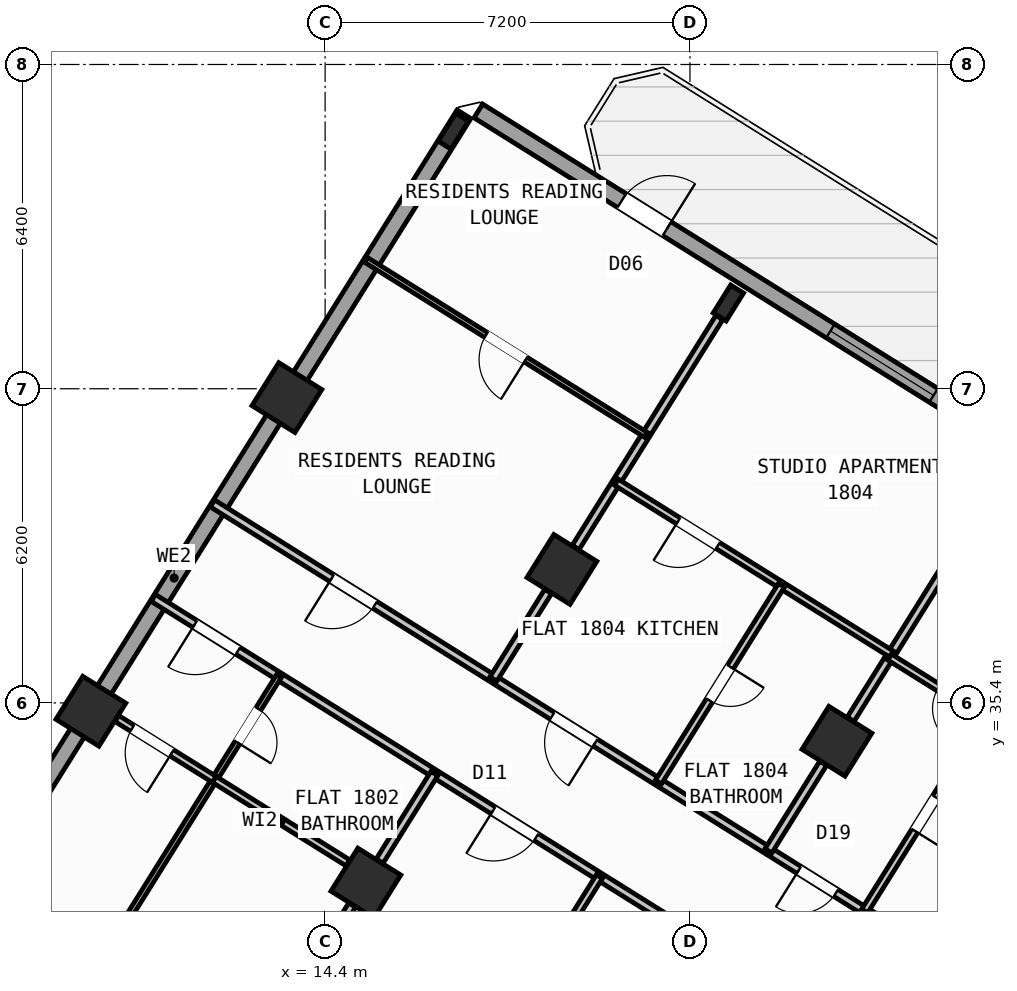
"""IFC4 building model, lengths in metres.
Left out: names, types, materials, properties, quantities, classifications, styles, units other than length and angle.
Written with IfcOpenShell. Run it as: python <this file> out.ifc"""

import sys

from ifc_helpers import new_model, si_unit, direction, frame, frame_2d, origin, origin_2d, place, context, subcontext, project, spatial, rectangle, hollow_rectangle, i_section, extrude, source, transform, mapped, element, fill, save


model = new_model("IFC4")
c1 = context("Model", 3, precision=1e-05, world=origin(), true_north=direction((0.0, 1.0)))
c2 = subcontext(c1, "Body", "Model", "MODEL_VIEW")
j1 = project(units=[si_unit("LENGTHUNIT", "METRE"), si_unit("PLANEANGLEUNIT", "RADIAN")], contexts=[c1])
p1 = place(None, origin())
s1 = spatial("IfcSite", under=j1, at=p1, CompositionType="ELEMENT")
p2 = place(p1, origin())
s2 = spatial("IfcBuilding", under=s1, at=p2, CompositionType="ELEMENT")
p3 = place(p2, frame((0.0, 0.0, 71.7)))
s3 = spatial("IfcBuildingStorey", under=s2, at=p3, CompositionType="ELEMENT", Elevation=71.7)
m1 = source(origin(), c2, "Body", "SweptSolid", [
    extrude(hollow_rectangle(XDim=1.0, YDim=1.0, WallThickness=0.04, at=origin_2d()), origin(), (0.0, 0.0, 1.0), 4.8),
])
p4 = place(p3, frame((24.5, 34.643, 0.0), z_axis=(0.0, 0.0, 1.0), x_axis=(-0.848048096156, 0.529919264233, 0.0)))
e1 = element("IfcColumn", 1, at=p4, inside=s3, PredefinedType="COLUMN", context=c2, shape_type="MappedRepresentation", body=[
    mapped(m1, transform((0.0, 0.0, 0.0), scale=1.0)),
])
m2 = source(origin(), c2, "Body", "SweptSolid", [
    extrude(i_section(OverallWidth=0.3, OverallDepth=0.65, WebThickness=0.016, FlangeThickness=0.031, at=origin_2d()), origin(), (0.0, 0.0, 1.0), 4.8),
])
p5 = place(p3, frame((22.358, 43.292, 0.0), z_axis=(0.0, 0.0, 1.0), x_axis=(-0.848048096156, 0.529919264233, 0.0)))
e2 = element("IfcColumn", 2, at=p5, inside=s3, PredefinedType="COLUMN", context=c2, shape_type="MappedRepresentation", body=[
    mapped(m2, transform((0.0, 0.0, 0.0), scale=1.0)),
])
for number, where, z_axis, x_axis in (
    (3, (19.073, 38.034, 0.0), (0.0, 0.0, 1.0), (-0.848, 0.53, 0.0)),
    (4, (15.205, 31.844, 0.0), (0.0, 0.0, 1.0), (-0.848, 0.53, 0.0)),
):
    element("IfcColumn", number, at=place(p3, frame(where, z_axis=z_axis, x_axis=x_axis)), inside=s3, PredefinedType="COLUMN", context=c2, shape_type="MappedRepresentation", body=[
        mapped(m1, transform((0.0, 0.0, 0.0), scale=1.0)),
    ])
p6 = place(p3, frame((16.931, 46.684, 0.0), z_axis=(0.0, 0.0, 1.0), x_axis=(-0.848048096156, 0.529919264233, 0.0)))
e5 = element("IfcColumn", 5, at=p6, inside=s3, PredefinedType="COLUMN", context=c2, shape_type="MappedRepresentation", body=[
    mapped(m2, transform((0.0, 0.0, 0.0), scale=1.0)),
])
for number, where, z_axis, x_axis in (
    (6, (13.646, 41.426, 0.0), (0.0, 0.0, 1.0), (-0.848, 0.53, 0.0)),
    (7, (9.777, 35.235, 0.0), (0.0, 0.0, 1.0), (-0.848, 0.53, 0.0)),
):
    element("IfcColumn", number, at=place(p3, frame(where, z_axis=z_axis, x_axis=x_axis)), inside=s3, PredefinedType="COLUMN", context=c2, shape_type="MappedRepresentation", body=[
        mapped(m1, transform((0.0, 0.0, 0.0), scale=1.0)),
    ])
p7 = place(p3, frame((5.7, 28.71, 0.0), z_axis=(0.0, 0.0, 1.0), x_axis=(0.529923711467, 0.8480453172, 0.0)))
e8 = element("IfcWall", 8, at=p7, inside=s3, PredefinedType="STANDARD", context=c2, shape_type="SweptSolid", body=[
    extrude(rectangle(XDim=21.587, YDim=0.32, at=frame_2d((10.794, 0.0))), origin(), (0.0, 0.0, 1.0), 3.895),
])
p8 = place(p7, frame((2.844, 0.0, 0.75)))
e9 = element("IfcOpeningElement", 9, at=p8, cuts=e8, PredefinedType="OPENING", context=c2, shape_type="SweptSolid", body=[
    extrude(rectangle(XDim=2.4, YDim=1.6, at=frame_2d((1.2, 0.8))), frame((0.0, 0.17, 0.0), z_axis=(0.0, -1.0, 0.0), x_axis=(1.0, 0.0, 0.0)), (0.0, 0.0, 1.0), 0.34),
])
p9 = place(p3, frame((17.424, 47.083, 0.0), z_axis=(0.0, 0.0, 1.0), x_axis=(0.848049927979, -0.529916332693, 0.0)))
e10 = element("IfcWall", 10, at=p9, inside=s3, PredefinedType="STANDARD", context=c2, shape_type="SweptSolid", body=[
    extrude(rectangle(XDim=29.223, YDim=0.32, at=frame_2d((14.612, 0.0))), origin(), (0.0, 0.0, 1.0), 4.52),
])
p10 = place(p9, frame((3.339, 0.0, 0.0)))
e11 = element("IfcOpeningElement", 11, at=p10, cuts=e10, PredefinedType="OPENING", context=c2, shape_type="SweptSolid", body=[
    extrude(rectangle(XDim=1.05, YDim=2.15, at=frame_2d((0.525, 1.075))), frame((0.0, 0.17, 0.0), z_axis=(0.0, -1.0, 0.0), x_axis=(1.0, 0.0, 0.0)), (0.0, 0.0, 1.0), 0.34),
])
p11 = place(p9, frame((8.194, 0.0, 0.75)))
e12 = element("IfcOpeningElement", 12, at=p11, cuts=e10, PredefinedType="OPENING", context=c2, shape_type="SweptSolid", body=[
    extrude(rectangle(XDim=2.4, YDim=1.6, at=frame_2d((1.2, 0.8))), frame((0.0, 0.17, 0.0), z_axis=(0.0, -1.0, 0.0), x_axis=(1.0, 0.0, 0.0)), (0.0, 0.0, 1.0), 0.34),
])
p12 = place(p9, frame((22.226, 0.0, 0.85)))
e13 = element("IfcOpeningElement", 13, at=p12, cuts=e10, PredefinedType="OPENING", context=c2, shape_type="SweptSolid", body=[
    extrude(rectangle(XDim=1.8, YDim=1.5, at=frame_2d((0.9, 0.75))), frame((0.0, 0.17, 0.0), z_axis=(0.0, -1.0, 0.0), x_axis=(1.0, 0.0, 0.0)), (0.0, 0.0, 1.0), 0.34),
])
p13 = place(p9, frame((26.934, 0.0, 0.95)))
e14 = element("IfcOpeningElement", 14, at=p13, cuts=e10, PredefinedType="OPENING", context=c2, shape_type="SweptSolid", body=[
    extrude(rectangle(XDim=1.2, YDim=1.4, at=frame_2d((0.6, 0.7))), frame((0.0, 0.17, 0.0), z_axis=(0.0, -1.0, 0.0), x_axis=(1.0, 0.0, 0.0)), (0.0, 0.0, 1.0), 0.34),
])
p14 = place(p9, frame((14.636, 0.0, 1.0)))
e15 = element("IfcOpeningElement", 15, at=p14, cuts=e10, PredefinedType="OPENING", context=c2, shape_type="SweptSolid", body=[
    extrude(rectangle(XDim=0.9, YDim=1.25, at=frame_2d((0.45, 0.625))), frame((0.0, 0.17, 0.0), z_axis=(0.0, -1.0, 0.0), x_axis=(1.0, 0.0, 0.0)), (0.0, 0.0, 1.0), 0.34),
])
p15 = place(p3, frame((31.239, 38.274, 0.0), z_axis=(0.0, 0.0, 1.0), x_axis=(-0.529920220799, -0.848047498427, 0.0)))
e16 = element("IfcWall", 16, at=p15, inside=s3, PredefinedType="PARTITIONING", context=c2, shape_type="SweptSolid", body=[
    extrude(rectangle(XDim=9.2, YDim=0.16, at=frame_2d((4.6, 0.0))), origin(), (0.0, 0.0, 1.0), 4.51),
])
p16 = place(p3, frame((26.363, 30.472, 0.0), z_axis=(0.0, 0.0, 1.0), x_axis=(-0.848052408131, 0.529912363569, 0.0)))
e17 = element("IfcWall", 17, at=p16, inside=s3, PredefinedType="PARTITIONING", context=c2, shape_type="SweptSolid", body=[
    extrude(rectangle(XDim=16.73, YDim=0.16, at=frame_2d((8.365, 0.0))), origin(), (0.0, 0.0, 1.0), 4.51),
])
p17 = place(p16, frame((2.22, 0.0, 0.0)))
e18 = element("IfcOpeningElement", 18, at=p17, cuts=e17, PredefinedType="OPENING", context=c2, shape_type="SweptSolid", body=[
    extrude(rectangle(XDim=0.86, YDim=2.05, at=frame_2d((0.43, 1.025))), frame((0.0, 0.09, 0.0), z_axis=(0.0, -1.0, 0.0), x_axis=(1.0, 0.0, 0.0)), (0.0, 0.0, 1.0), 0.18),
])
p18 = place(p16, frame((7.82, 0.0, 0.0)))
e19 = element("IfcOpeningElement", 19, at=p18, cuts=e17, PredefinedType="OPENING", context=c2, shape_type="SweptSolid", body=[
    extrude(rectangle(XDim=1.0, YDim=2.1, at=frame_2d((0.5, 1.05))), frame((0.0, 0.09, 0.0), z_axis=(0.0, -1.0, 0.0), x_axis=(1.0, 0.0, 0.0)), (0.0, 0.0, 1.0), 0.18),
])
p19 = place(p16, frame((12.95, 0.0, 0.0)))
e20 = element("IfcOpeningElement", 20, at=p19, cuts=e17, PredefinedType="OPENING", context=c2, shape_type="SweptSolid", body=[
    extrude(rectangle(XDim=1.0, YDim=2.1, at=frame_2d((0.5, 1.05))), frame((0.0, 0.09, 0.0), z_axis=(0.0, -1.0, 0.0), x_axis=(1.0, 0.0, 0.0)), (0.0, 0.0, 1.0), 0.18),
])
p20 = place(p3, frame((25.198, 28.606, 0.0), z_axis=(0.0, 0.0, 1.0), x_axis=(-0.848052408131, 0.529912363569, 0.0)))
e21 = element("IfcWall", 21, at=p20, inside=s3, PredefinedType="PARTITIONING", context=c2, shape_type="SweptSolid", body=[
    extrude(rectangle(XDim=16.73, YDim=0.16, at=frame_2d((8.365, 0.0))), origin(), (0.0, 0.0, 1.0), 4.51),
])
p21 = place(p20, frame((1.395, 0.0, 0.0)))
e22 = element("IfcOpeningElement", 22, at=p21, cuts=e21, PredefinedType="OPENING", context=c2, shape_type="SweptSolid", body=[
    extrude(rectangle(XDim=1.0, YDim=2.1, at=frame_2d((0.5, 1.05))), frame((0.0, 0.09, 0.0), z_axis=(0.0, -1.0, 0.0), x_axis=(1.0, 0.0, 0.0)), (0.0, 0.0, 1.0), 0.18),
])
p22 = place(p20, frame((7.82, 0.0, 0.0)))
e23 = element("IfcOpeningElement", 23, at=p22, cuts=e21, PredefinedType="OPENING", context=c2, shape_type="SweptSolid", body=[
    extrude(rectangle(XDim=1.0, YDim=2.1, at=frame_2d((0.5, 1.05))), frame((0.0, 0.09, 0.0), z_axis=(0.0, -1.0, 0.0), x_axis=(1.0, 0.0, 0.0)), (0.0, 0.0, 1.0), 0.18),
])
p23 = place(p20, frame((14.76, 0.0, 0.0)))
e24 = element("IfcOpeningElement", 24, at=p23, cuts=e21, PredefinedType="OPENING", context=c2, shape_type="SweptSolid", body=[
    extrude(rectangle(XDim=1.0, YDim=2.1, at=frame_2d((0.5, 1.05))), frame((0.0, 0.09, 0.0), z_axis=(0.0, -1.0, 0.0), x_axis=(1.0, 0.0, 0.0)), (0.0, 0.0, 1.0), 0.18),
])
p24 = place(p3, frame((16.556, 34.006, 0.0), z_axis=(0.0, 0.0, 1.0), x_axis=(-0.529966635742, -0.848018493313, 0.0)))
e25 = element("IfcWall", 25, at=p24, inside=s3, PredefinedType="PARTITIONING", context=c2, shape_type="SweptSolid", body=[
    extrude(rectangle(XDim=2.038, YDim=0.16, at=frame_2d((1.019, 0.0))), origin(), (0.0, 0.0, 1.0), 3.895),
])
p25 = place(p3, frame((14.933, 31.409, 0.0), z_axis=(0.0, 0.0, 1.0), x_axis=(-0.529897533635, -0.848061674554, 0.0)))
e26 = element("IfcWall", 26, at=p25, inside=s3, PredefinedType="PARTITIONING", context=c2, shape_type="SweptSolid", body=[
    extrude(rectangle(XDim=6.276, YDim=0.16, at=frame_2d((3.138, 0.0))), origin(), (0.0, 0.0, 1.0), 3.895),
])
p26 = place(p3, frame((19.812, 31.971, 0.0), z_axis=(0.0, 0.0, 1.0), x_axis=(-0.529917480809, -0.848049210561, 0.0)))
e27 = element("IfcWall", 27, at=p26, inside=s3, PredefinedType="PLUMBINGWALL", context=c2, shape_type="SweptSolid", body=[
    extrude(rectangle(XDim=4.58, YDim=0.14, at=frame_2d((2.29, 0.0))), origin(), (0.0, 0.0, 1.0), 4.51),
])
p27 = place(p26, frame((1.9, 0.0, 0.0)))
e28 = element("IfcOpeningElement", 28, at=p27, cuts=e27, PredefinedType="OPENING", context=c2, shape_type="SweptSolid", body=[
    extrude(rectangle(XDim=0.78, YDim=2.05, at=frame_2d((0.39, 1.025))), frame((0.0, 0.08, 0.0), z_axis=(0.0, -1.0, 0.0), x_axis=(1.0, 0.0, 0.0)), (0.0, 0.0, 1.0), 0.16),
])
p28 = place(p3, frame((13.486, 35.924, 0.0), z_axis=(0.0, 0.0, 1.0), x_axis=(-0.529924195719, -0.848045014602, 0.0)))
e29 = element("IfcWall", 29, at=p28, inside=s3, PredefinedType="PARTITIONING", context=c2, shape_type="SweptSolid", body=[
    extrude(rectangle(XDim=10.57, YDim=0.11, at=frame_2d((5.285, 0.0))), origin(), (0.0, 0.0, 1.0), 4.51),
])
p29 = place(p28, frame((0.76, 0.0, 0.0)))
e30 = element("IfcOpeningElement", 30, at=p29, cuts=e29, PredefinedType="OPENING", context=c2, shape_type="SweptSolid", body=[
    extrude(rectangle(XDim=0.78, YDim=2.05, at=frame_2d((0.39, 1.025))), frame((0.0, 0.065, 0.0), z_axis=(0.0, -1.0, 0.0), x_axis=(1.0, 0.0, 0.0)), (0.0, 0.0, 1.0), 0.13),
])
p30 = place(p28, frame((6.025, 0.0, 0.0)))
e31 = element("IfcOpeningElement", 31, at=p30, cuts=e29, PredefinedType="OPENING", context=c2, shape_type="SweptSolid", body=[
    extrude(rectangle(XDim=0.92, YDim=2.08, at=frame_2d((0.46, 1.04))), frame((0.0, 0.065, 0.0), z_axis=(0.0, -1.0, 0.0), x_axis=(1.0, 0.0, 0.0)), (0.0, 0.0, 1.0), 0.13),
])
p31 = place(p3, frame((12.214, 33.889, 0.0), z_axis=(0.0, 0.0, 1.0), x_axis=(-0.848082963347, 0.529863460979, 0.0)))
e32 = element("IfcWall", 32, at=p31, inside=s3, PredefinedType="PLUMBINGWALL", context=c2, shape_type="SweptSolid", body=[
    extrude(rectangle(XDim=2.268, YDim=0.14, at=frame_2d((1.134, 0.0))), origin(), (0.0, 0.0, 1.0), 3.895),
])
p32 = place(p31, frame((0.99, 0.0, 0.0)))
e33 = element("IfcOpeningElement", 33, at=p32, cuts=e32, PredefinedType="OPENING", context=c2, shape_type="SweptSolid", body=[
    extrude(rectangle(XDim=0.92, YDim=2.08, at=frame_2d((0.46, 1.04))), frame((0.0, 0.08, 0.0), z_axis=(0.0, -1.0, 0.0), x_axis=(1.0, 0.0, 0.0)), (0.0, 0.0, 1.0), 0.16),
])
p33 = place(p3, frame((14.85, 32.242, 0.0), z_axis=(0.0, 0.0, 1.0), x_axis=(-0.848051256418, 0.529914206724, 0.0)))
e34 = element("IfcWall", 34, at=p33, inside=s3, PredefinedType="PLUMBINGWALL", context=c2, shape_type="SweptSolid", body=[
    extrude(rectangle(XDim=3.108, YDim=0.14, at=frame_2d((1.554, 0.0))), origin(), (0.0, 0.0, 1.0), 3.895),
])
p34 = place(p3, frame((27.607, 39.615, 0.0), z_axis=(0.0, 0.0, 1.0), x_axis=(-0.529937421401, -0.848036750028, 0.0)))
e35 = element("IfcWall", 35, at=p34, inside=s3, PredefinedType="PARTITIONING", context=c2, shape_type="SweptSolid", body=[
    extrude(rectangle(XDim=5.351, YDim=0.16, at=frame_2d((2.676, 0.0))), origin(), (0.0, 0.0, 1.0), 3.895),
])
p35 = place(p3, frame((24.229, 34.209, 0.0), z_axis=(0.0, 0.0, 1.0), x_axis=(-0.529826648289, -0.84810596199, 0.0)))
e36 = element("IfcWall", 36, at=p35, inside=s3, PredefinedType="PARTITIONING", context=c2, shape_type="SweptSolid", body=[
    extrude(rectangle(XDim=2.038, YDim=0.16, at=frame_2d((1.019, 0.0))), origin(), (0.0, 0.0, 1.0), 3.895),
])
p36 = place(p3, frame((28.753, 34.297, 0.0), z_axis=(0.0, 0.0, 1.0), x_axis=(-0.848059820872, 0.529900500304, 0.0)))
e37 = element("IfcWall", 37, at=p36, inside=s3, PredefinedType="PLUMBINGWALL", context=c2, shape_type="SweptSolid", body=[
    extrude(rectangle(XDim=3.79, YDim=0.14, at=frame_2d((1.895, 0.0))), origin(), (0.0, 0.0, 1.0), 4.51),
])
p37 = place(p36, frame((1.87, 0.0, 0.0)))
e38 = element("IfcOpeningElement", 38, at=p37, cuts=e37, PredefinedType="OPENING", context=c2, shape_type="SweptSolid", body=[
    extrude(rectangle(XDim=0.78, YDim=2.05, at=frame_2d((0.39, 1.025))), frame((0.0, 0.08, 0.0), z_axis=(0.0, -1.0, 0.0), x_axis=(1.0, 0.0, 0.0)), (0.0, 0.0, 1.0), 0.16),
])
p38 = place(p3, frame((27.439, 35.118, 0.0), z_axis=(0.0, 0.0, 1.0), x_axis=(-0.529911350634, -0.84805304107, 0.0)))
e39 = element("IfcWall", 39, at=p38, inside=s3, PredefinedType="PLUMBINGWALL", context=c2, shape_type="SweptSolid", body=[
    extrude(rectangle(XDim=4.51, YDim=0.14, at=frame_2d((2.255, 0.0))), origin(), (0.0, 0.0, 1.0), 4.135),
])
p39 = place(p38, frame((1.865, 0.0, 0.0)))
e40 = element("IfcOpeningElement", 40, at=p39, cuts=e39, PredefinedType="OPENING", context=c2, shape_type="SweptSolid", body=[
    extrude(rectangle(XDim=0.78, YDim=2.05, at=frame_2d((0.39, 1.025))), frame((0.0, 0.08, 0.0), z_axis=(0.0, -1.0, 0.0), x_axis=(1.0, 0.0, 0.0)), (0.0, 0.0, 1.0), 0.16),
])
p40 = place(p3, frame((22.18, 43.006, 0.0), z_axis=(0.0, 0.0, 1.0), x_axis=(-0.529937421401, -0.848036750028, 0.0)))
e41 = element("IfcWall", 41, at=p40, inside=s3, PredefinedType="PARTITIONING", context=c2, shape_type="SweptSolid", body=[
    extrude(rectangle(XDim=5.351, YDim=0.16, at=frame_2d((2.676, 0.0))), origin(), (0.0, 0.0, 1.0), 3.895),
])
p41 = place(p3, frame((18.802, 37.6, 0.0), z_axis=(0.0, 0.0, 1.0), x_axis=(-0.529880479764, -0.848072330149, 0.0)))
e42 = element("IfcWall", 42, at=p41, inside=s3, PredefinedType="PARTITIONING", context=c2, shape_type="SweptSolid", body=[
    extrude(rectangle(XDim=2.038, YDim=0.16, at=frame_2d((1.019, 0.0))), origin(), (0.0, 0.0, 1.0), 3.895),
])
p42 = place(p3, frame((25.576, 36.365, 0.0), z_axis=(0.0, 0.0, 1.0), x_axis=(-0.848056163074, 0.529906354247, 0.0)))
e43 = element("IfcWall", 43, at=p42, inside=s3, PredefinedType="PLUMBINGWALL", context=c2, shape_type="SweptSolid", body=[
    extrude(rectangle(XDim=6.4, YDim=0.14, at=frame_2d((3.2, 0.0))), origin(), (0.0, 0.0, 1.0), 4.51),
])
p43 = place(p42, frame((4.04, 0.0, 0.0)))
e44 = element("IfcOpeningElement", 44, at=p43, cuts=e43, PredefinedType="OPENING", context=c2, shape_type="SweptSolid", body=[
    extrude(rectangle(XDim=0.92, YDim=2.08, at=frame_2d((0.46, 1.04))), frame((0.0, 0.08, 0.0), z_axis=(0.0, -1.0, 0.0), x_axis=(1.0, 0.0, 0.0)), (0.0, 0.0, 1.0), 0.16),
])
p44 = place(p3, frame((23.405, 37.721, 0.0), z_axis=(0.0, 0.0, 1.0), x_axis=(-0.529955816375, -0.848025254748, 0.0)))
e45 = element("IfcWall", 45, at=p44, inside=s3, PredefinedType="PLUMBINGWALL", context=c2, shape_type="SweptSolid", body=[
    extrude(rectangle(XDim=4.58, YDim=0.14, at=frame_2d((2.29, 0.0))), origin(), (0.0, 0.0, 1.0), 4.51),
])
p45 = place(p44, frame((1.9, 0.0, 0.0)))
e46 = element("IfcOpeningElement", 46, at=p45, cuts=e45, PredefinedType="OPENING", context=c2, shape_type="SweptSolid", body=[
    extrude(rectangle(XDim=0.78, YDim=2.05, at=frame_2d((0.39, 1.025))), frame((0.0, 0.08, 0.0), z_axis=(0.0, -1.0, 0.0), x_axis=(1.0, 0.0, 0.0)), (0.0, 0.0, 1.0), 0.16),
])
p46 = place(p3, frame((20.733, 40.69, 0.0), z_axis=(0.0, 0.0, 1.0), x_axis=(-0.848048787466, 0.529918157905, 0.0)))
e47 = element("IfcWall", 47, at=p46, inside=s3, PredefinedType="PARTITIONING", context=c2, shape_type="SweptSolid", body=[
    extrude(rectangle(XDim=6.52, YDim=0.11, at=frame_2d((3.26, 0.0))), origin(), (0.0, 0.0, 1.0), 4.51),
])
p47 = place(p46, frame((2.8, 0.0, 0.0)))
e48 = element("IfcOpeningElement", 48, at=p47, cuts=e47, PredefinedType="OPENING", context=c2, shape_type="SweptSolid", body=[
    extrude(rectangle(XDim=0.92, YDim=2.08, at=frame_2d((0.46, 1.04))), frame((0.0, 0.065, 0.0), z_axis=(0.0, -1.0, 0.0), x_axis=(1.0, 0.0, 0.0)), (0.0, 0.0, 1.0), 0.13),
])
m3 = source(origin(), c2, "Body", "SweptSolid", [
    extrude(rectangle(XDim=1.05, YDim=2.15, at=frame_2d((0.525, 1.075))), frame((0.0, 0.025, 0.0), z_axis=(0.0, -1.0, 0.0), x_axis=(1.0, 0.0, 0.0)), (0.0, 0.0, 1.0), 0.05),
])
p48 = place(p10, origin())
e49 = element("IfcDoor", 49, at=p48, inside=s3, OperationType="SINGLE_SWING_RIGHT", PredefinedType="DOOR", context=c2, shape_type="MappedRepresentation", body=[
    mapped(m3, transform((0.0, 0.0, 0.0), scale=1.0)),
])
fill(e11, e49)
m4 = source(origin(), c2, "Body", "SweptSolid", [
    extrude(rectangle(XDim=2.4, YDim=1.6, at=frame_2d((1.2, 0.8))), frame((0.0, 0.03, 0.0), z_axis=(0.0, -1.0, 0.0), x_axis=(1.0, 0.0, 0.0)), (0.0, 0.0, 1.0), 0.06),
])
p49 = place(p11, origin())
e50 = element("IfcWindow", 50, at=p49, inside=s3, PartitioningType="SINGLE_PANEL", PredefinedType="WINDOW", context=c2, shape_type="MappedRepresentation", body=[
    mapped(m4, transform((0.0, 0.0, 0.0), scale=1.0)),
])
fill(e12, e50)
m5 = source(origin(), c2, "Body", "SweptSolid", [
    extrude(rectangle(XDim=1.0, YDim=2.1, at=frame_2d((0.5, 1.05))), frame((0.0, 0.025, 0.0), z_axis=(0.0, -1.0, 0.0), x_axis=(1.0, 0.0, 0.0)), (0.0, 0.0, 1.0), 0.05),
])
p50 = place(p22, origin())
e51 = element("IfcDoor", 51, at=p50, inside=s3, OperationType="SINGLE_SWING_RIGHT", PredefinedType="DOOR", context=c2, shape_type="MappedRepresentation", body=[
    mapped(m5, transform((0.0, 0.0, 0.0), scale=1.0)),
])
fill(e23, e51)
p51 = place(p23, origin())
e52 = element("IfcDoor", 52, at=p51, inside=s3, OperationType="SINGLE_SWING_RIGHT", PredefinedType="DOOR", context=c2, shape_type="MappedRepresentation", body=[
    mapped(m5, transform((0.0, 0.0, 0.0), scale=1.0)),
])
fill(e24, e52)
m6 = source(origin(), c2, "Body", "SweptSolid", [
    extrude(rectangle(XDim=0.92, YDim=2.08, at=frame_2d((0.46, 1.04))), frame((0.0, 0.025, 0.0), z_axis=(0.0, -1.0, 0.0), x_axis=(1.0, 0.0, 0.0)), (0.0, 0.0, 1.0), 0.05),
])
p52 = place(p32, origin())
e53 = element("IfcDoor", 53, at=p52, inside=s3, OperationType="SINGLE_SWING_LEFT", PredefinedType="DOOR", context=c2, shape_type="MappedRepresentation", body=[
    mapped(m6, transform((0.0, 0.0, 0.0), scale=1.0)),
])
fill(e33, e53)
m7 = source(origin(), c2, "Body", "SweptSolid", [
    extrude(rectangle(XDim=0.78, YDim=2.05, at=frame_2d((0.39, 1.025))), frame((0.0, 0.025, 0.0), z_axis=(0.0, -1.0, 0.0), x_axis=(1.0, 0.0, 0.0)), (0.0, 0.0, 1.0), 0.05),
])
p53 = place(p29, origin())
e54 = element("IfcDoor", 54, at=p53, inside=s3, OperationType="SINGLE_SWING_RIGHT", PredefinedType="DOOR", context=c2, shape_type="MappedRepresentation", body=[
    mapped(m7, transform((0.0, 0.0, 0.0), scale=1.0)),
])
fill(e30, e54)
m8 = source(origin(), c2, "Body", "SweptSolid", [
    extrude(rectangle(XDim=0.86, YDim=2.05, at=frame_2d((0.43, 1.025))), frame((0.0, 0.025, 0.0), z_axis=(0.0, -1.0, 0.0), x_axis=(1.0, 0.0, 0.0)), (0.0, 0.0, 1.0), 0.05),
])
p54 = place(p17, origin())
e55 = element("IfcDoor", 55, at=p54, inside=s3, OperationType="SINGLE_SWING_RIGHT", PredefinedType="DOOR", context=c2, shape_type="MappedRepresentation", body=[
    mapped(m8, transform((0.0, 0.0, 0.0), scale=1.0)),
])
fill(e18, e55)
p55 = place(p39, origin())
e56 = element("IfcDoor", 56, at=p55, inside=s3, OperationType="SINGLE_SWING_RIGHT", PredefinedType="DOOR", context=c2, shape_type="MappedRepresentation", body=[
    mapped(m7, transform((0.0, 0.0, 0.0), scale=1.0)),
])
fill(e40, e56)
p56 = place(p18, origin())
e57 = element("IfcDoor", 57, at=p56, inside=s3, OperationType="SINGLE_SWING_LEFT", PredefinedType="DOOR", context=c2, shape_type="MappedRepresentation", body=[
    mapped(m5, transform((0.0, 0.0, 0.0), scale=1.0)),
])
fill(e19, e57)
p57 = place(p43, origin())
e58 = element("IfcDoor", 58, at=p57, inside=s3, OperationType="SINGLE_SWING_RIGHT", PredefinedType="DOOR", context=c2, shape_type="MappedRepresentation", body=[
    mapped(m6, transform((0.0, 0.0, 0.0), scale=1.0)),
])
fill(e44, e58)
p58 = place(p45, origin())
e59 = element("IfcDoor", 59, at=p58, inside=s3, OperationType="SINGLE_SWING_LEFT", PredefinedType="DOOR", context=c2, shape_type="MappedRepresentation", body=[
    mapped(m7, transform((0.0, 0.0, 0.0), scale=1.0)),
])
fill(e46, e59)
p59 = place(p19, origin())
e60 = element("IfcDoor", 60, at=p59, inside=s3, OperationType="SINGLE_SWING_RIGHT", PredefinedType="DOOR", context=c2, shape_type="MappedRepresentation", body=[
    mapped(m5, transform((0.0, 0.0, 0.0), scale=1.0)),
])
fill(e20, e60)
p60 = place(p47, origin())
e61 = element("IfcDoor", 61, at=p60, inside=s3, OperationType="SINGLE_SWING_LEFT", PredefinedType="DOOR", context=c2, shape_type="MappedRepresentation", body=[
    mapped(m6, transform((0.0, 0.0, 0.0), scale=1.0)),
])
fill(e48, e61)
save(model, sys.argv[1])
